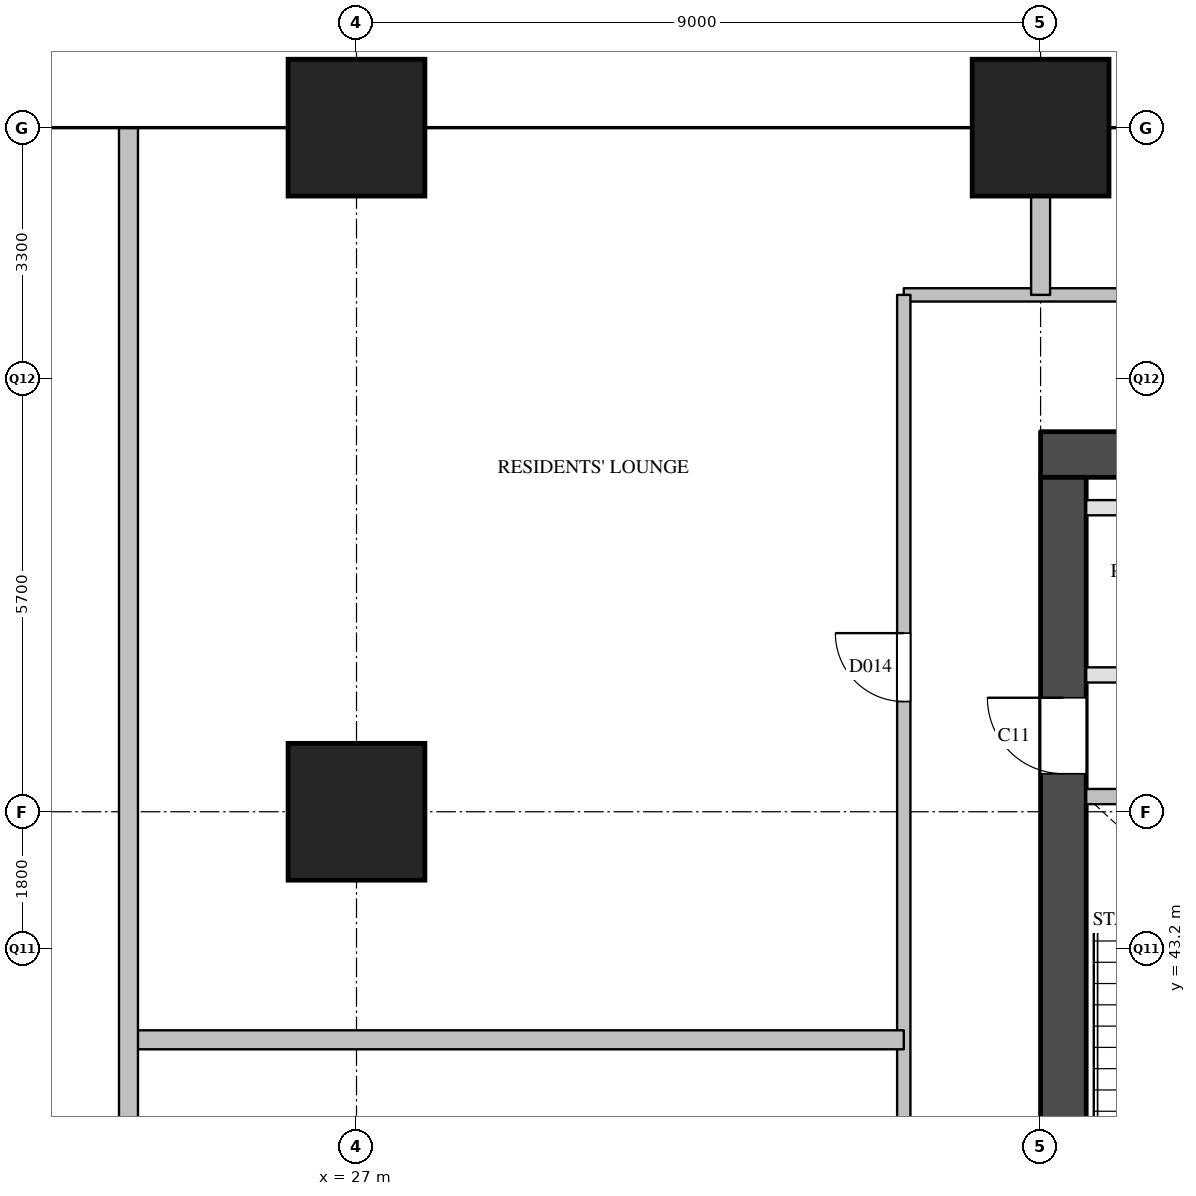
"""IFC4 building model, lengths in metres.
Left out: names, types, materials, properties, quantities, classifications, styles, units other than length and angle.
Written with IfcOpenShell. Run it as: python <this file> out.ifc"""

import sys

from ifc_helpers import new_model, si_unit, direction, frame, frame_2d, origin, origin_2d, place, context, subcontext, project, spatial, rectangle, extrude, element, fill, save


model = new_model("IFC4")
c1 = context("Model", 3, precision=1e-05, world=origin(), true_north=direction((0.0, 1.0)))
c2 = subcontext(c1, "Body", "Model", "MODEL_VIEW")
j1 = project(units=[si_unit("LENGTHUNIT", "METRE"), si_unit("PLANEANGLEUNIT", "RADIAN")], contexts=[c1])
p1 = place(None, origin())
s1 = spatial("IfcSite", under=j1, at=p1, CompositionType="ELEMENT")
p2 = place(p1, origin())
s2 = spatial("IfcBuilding", under=s1, at=p2, CompositionType="ELEMENT")
p3 = place(p2, frame((0.0, 0.0, 77.8)))
s3 = spatial("IfcBuildingStorey", under=s2, at=p3, CompositionType="ELEMENT", Elevation=77.8)
for number, where, z_axis, x_axis in (
    (1, (27.0, 45.0, 0.0), (0.0, 0.0, 1.0), (1.0, 0.0, 0.0)),
    (2, (27.0, 54.0, 0.0), (0.0, 0.0, 1.0), (1.0, 0.0, 0.0)),
    (3, (36.0, 54.0, 0.0), (0.0, 0.0, 1.0), (1.0, 0.0, 0.0)),
):
    element("IfcColumn", number, at=place(p3, frame(where, z_axis=z_axis, x_axis=x_axis)), inside=s3, PredefinedType="COLUMN", context=c2, shape_type="SweptSolid", body=[
        extrude(rectangle(XDim=1.8, YDim=1.8, at=origin_2d()), origin(), (0.0, 0.0, 1.0), 3.8),
    ])
p4 = place(p3, frame((36.0, 49.7, 0.0), z_axis=(0.0, 0.0, 1.0), x_axis=(1.0, 0.0, 0.0)))
e4 = element("IfcWall", 4, at=p4, inside=s3, PredefinedType="SHEAR", context=c2, shape_type="SweptSolid", body=[
    extrude(rectangle(XDim=12.4, YDim=0.6, at=frame_2d((6.2, 0.0))), origin(), (0.0, 0.0, 1.0), 3.5),
])
p5 = place(p3, frame((36.3, 29.1, 0.0), z_axis=(0.0, 0.0, 1.0), x_axis=(0.0, 1.0, 0.0)))
e5 = element("IfcWall", 5, at=p5, inside=s3, PredefinedType="SHEAR", context=c2, shape_type="SweptSolid", body=[
    extrude(rectangle(XDim=20.3, YDim=0.6, at=frame_2d((10.15, 0.0))), origin(), (0.0, 0.0, 1.0), 3.5),
])
p6 = place(p5, frame((3.6, 0.0, 0.0)))
e6 = element("IfcOpeningElement", 6, at=p6, cuts=e5, PredefinedType="OPENING", context=c2, shape_type="SweptSolid", body=[
    extrude(rectangle(XDim=1.8, YDim=2.1, at=frame_2d((0.9, 1.05))), frame((0.0, 0.31, 0.0), z_axis=(0.0, -1.0, 0.0), x_axis=(1.0, 0.0, 0.0)), (0.0, 0.0, 1.0), 0.62),
])
p7 = place(p5, frame((16.4, 0.0, 0.0)))
e7 = element("IfcOpeningElement", 7, at=p7, cuts=e5, PredefinedType="OPENING", context=c2, shape_type="SweptSolid", body=[
    extrude(rectangle(XDim=1.0, YDim=2.1, at=frame_2d((0.5, 1.05))), frame((0.0, 0.31, 0.0), z_axis=(0.0, -1.0, 0.0), x_axis=(1.0, 0.0, 0.0)), (0.0, 0.0, 1.0), 0.62),
])
p8 = place(p3, frame((36.6, 45.2, 0.0), z_axis=(0.0, 0.0, 1.0), x_axis=(1.0, 0.0, 0.0)))
e8 = element("IfcWall", 8, at=p8, inside=s3, PredefinedType="SOLIDWALL", context=c2, shape_type="SweptSolid", body=[
    extrude(rectangle(XDim=10.05, YDim=0.2, at=frame_2d((5.025, 0.0))), origin(), (0.0, 0.0, 1.0), 3.5),
])
p9 = place(p8, frame((1.125, 0.0, 0.0)))
e9 = element("IfcOpeningElement", 9, at=p9, cuts=e8, PredefinedType="OPENING", context=c2, shape_type="SweptSolid", body=[
    extrude(rectangle(XDim=1.1, YDim=2.1, at=frame_2d((0.55, 1.05))), frame((0.0, 0.11, 0.0), z_axis=(0.0, -1.0, 0.0), x_axis=(1.0, 0.0, 0.0)), (0.0, 0.0, 1.0), 0.22),
])
p10 = place(p8, frame((4.475, 0.0, 0.0)))
e10 = element("IfcOpeningElement", 10, at=p10, cuts=e8, PredefinedType="OPENING", context=c2, shape_type="SweptSolid", body=[
    extrude(rectangle(XDim=1.1, YDim=2.1, at=frame_2d((0.55, 1.05))), frame((0.0, 0.11, 0.0), z_axis=(0.0, -1.0, 0.0), x_axis=(1.0, 0.0, 0.0)), (0.0, 0.0, 1.0), 0.22),
])
p11 = place(p8, frame((7.825, 0.0, 0.0)))
e11 = element("IfcOpeningElement", 11, at=p11, cuts=e8, PredefinedType="OPENING", context=c2, shape_type="SweptSolid", body=[
    extrude(rectangle(XDim=1.1, YDim=2.1, at=frame_2d((0.55, 1.05))), frame((0.0, 0.11, 0.0), z_axis=(0.0, -1.0, 0.0), x_axis=(1.0, 0.0, 0.0)), (0.0, 0.0, 1.0), 0.22),
])
p12 = place(p3, frame((36.6, 46.8, 0.0), z_axis=(0.0, 0.0, 1.0), x_axis=(1.0, 0.0, 0.0)))
e12 = element("IfcWall", 12, at=p12, inside=s3, PredefinedType="PARTITIONING", context=c2, shape_type="SweptSolid", body=[
    extrude(rectangle(XDim=11.2, YDim=0.2, at=frame_2d((5.6, 0.0))), origin(), (0.0, 0.0, 1.0), 3.5),
])
p13 = place(p12, frame((0.67, 0.0, 0.0)))
e13 = element("IfcOpeningElement", 13, at=p13, cuts=e12, PredefinedType="OPENING", context=c2, shape_type="SweptSolid", body=[
    extrude(rectangle(XDim=0.9, YDim=2.1, at=frame_2d((0.45, 1.05))), frame((0.0, 0.11, 0.0), z_axis=(0.0, -1.0, 0.0), x_axis=(1.0, 0.0, 0.0)), (0.0, 0.0, 1.0), 0.22),
])
p14 = place(p12, frame((4.59, 0.0, 0.0)))
e14 = element("IfcOpeningElement", 14, at=p14, cuts=e12, PredefinedType="OPENING", context=c2, shape_type="SweptSolid", body=[
    extrude(rectangle(XDim=0.9, YDim=2.1, at=frame_2d((0.45, 1.05))), frame((0.0, 0.11, 0.0), z_axis=(0.0, -1.0, 0.0), x_axis=(1.0, 0.0, 0.0)), (0.0, 0.0, 1.0), 0.22),
])
p15 = place(p12, frame((9.07, 0.0, 0.0)))
e15 = element("IfcOpeningElement", 15, at=p15, cuts=e12, PredefinedType="OPENING", context=c2, shape_type="SweptSolid", body=[
    extrude(rectangle(XDim=0.9, YDim=2.1, at=frame_2d((0.45, 1.05))), frame((0.0, 0.11, 0.0), z_axis=(0.0, -1.0, 0.0), x_axis=(1.0, 0.0, 0.0)), (0.0, 0.0, 1.0), 0.22),
])
p16 = place(p3, frame((36.6, 49.0, 0.0), z_axis=(0.0, 0.0, 1.0), x_axis=(1.0, 0.0, 0.0)))
e16 = element("IfcWall", 16, at=p16, inside=s3, PredefinedType="PARTITIONING", context=c2, shape_type="SweptSolid", body=[
    extrude(rectangle(XDim=11.2, YDim=0.2, at=frame_2d((5.6, 0.0))), origin(), (0.0, 0.0, 1.0), 3.5),
])
p17 = place(p3, frame((34.2, 51.8, 0.0), z_axis=(0.0, 0.0, 1.0), x_axis=(1.0, 0.0, 0.0)))
e17 = element("IfcWall", 17, at=p17, inside=s3, PredefinedType="PARTITIONING", context=c2, shape_type="SweptSolid", body=[
    extrude(rectangle(XDim=16.0, YDim=0.175, at=frame_2d((8.0, 0.0))), origin(), (0.0, 0.0, 1.0), 3.5),
])
p18 = place(p17, frame((7.129, 0.0, 0.0)))
e18 = element("IfcOpeningElement", 18, at=p18, cuts=e17, PredefinedType="OPENING", context=c2, shape_type="SweptSolid", body=[
    extrude(rectangle(XDim=0.9, YDim=2.1, at=frame_2d((0.45, 1.05))), frame((0.0, 0.097, 0.0), z_axis=(0.0, -1.0, 0.0), x_axis=(1.0, 0.0, 0.0)), (0.0, 0.0, 1.0), 0.195),
])
p19 = place(p3, frame((34.2, 29.12, 0.0), z_axis=(0.0, 0.0, 1.0), x_axis=(0.0, 1.0, 0.0)))
e19 = element("IfcWall", 19, at=p19, inside=s3, PredefinedType="PARTITIONING", context=c2, shape_type="SweptSolid", body=[
    extrude(rectangle(XDim=22.68, YDim=0.175, at=frame_2d((11.34, 0.0))), origin(), (0.0, 0.0, 1.0), 3.5),
])
p20 = place(p19, frame((2.94, 0.0, 0.0)))
e20 = element("IfcOpeningElement", 20, at=p20, cuts=e19, PredefinedType="OPENING", context=c2, shape_type="SweptSolid", body=[
    extrude(rectangle(XDim=1.0, YDim=2.1, at=frame_2d((0.5, 1.05))), frame((0.0, 0.097, 0.0), z_axis=(0.0, -1.0, 0.0), x_axis=(1.0, 0.0, 0.0)), (0.0, 0.0, 1.0), 0.195),
])
p21 = place(p19, frame((9.38, 0.0, 0.0)))
e21 = element("IfcOpeningElement", 21, at=p21, cuts=e19, PredefinedType="OPENING", context=c2, shape_type="SweptSolid", body=[
    extrude(rectangle(XDim=1.0, YDim=2.1, at=frame_2d((0.5, 1.05))), frame((0.0, 0.097, 0.0), z_axis=(0.0, -1.0, 0.0), x_axis=(1.0, 0.0, 0.0)), (0.0, 0.0, 1.0), 0.195),
])
p22 = place(p19, frame((17.33, 0.0, 0.0)))
e22 = element("IfcOpeningElement", 22, at=p22, cuts=e19, PredefinedType="OPENING", context=c2, shape_type="SweptSolid", body=[
    extrude(rectangle(XDim=0.9, YDim=2.1, at=frame_2d((0.45, 1.05))), frame((0.0, 0.097, 0.0), z_axis=(0.0, -1.0, 0.0), x_axis=(1.0, 0.0, 0.0)), (0.0, 0.0, 1.0), 0.195),
])
p23 = place(p3, frame((24.0, 42.0, 0.0), z_axis=(0.0, 0.0, 1.0), x_axis=(1.0, 0.0, 0.0)))
e23 = element("IfcWall", 23, at=p23, inside=s3, PredefinedType="PARTITIONING", context=c2, shape_type="SweptSolid", body=[
    extrude(rectangle(XDim=10.2, YDim=0.25, at=frame_2d((5.1, 0.0))), origin(), (0.0, 0.0, 1.0), 2.5),
])
p24 = place(p3, frame((24.0, 36.0, 0.0), z_axis=(0.0, 0.0, 1.0), x_axis=(0.0, 1.0, 0.0)))
e24 = element("IfcWall", 24, at=p24, inside=s3, PredefinedType="PARTITIONING", context=c2, shape_type="SweptSolid", body=[
    extrude(rectangle(XDim=18.0, YDim=0.25, at=frame_2d((9.0, 0.0))), origin(), (0.0, 0.0, 1.0), 2.5),
])
p25 = place(p3, frame((36.0, 51.8, 0.0), z_axis=(0.0, 0.0, 1.0), x_axis=(0.0, 1.0, 0.0)))
e25 = element("IfcWall", 25, at=p25, inside=s3, PredefinedType="PARTITIONING", context=c2, shape_type="SweptSolid", body=[
    extrude(rectangle(XDim=2.2, YDim=0.25, at=frame_2d((1.1, 0.0))), origin(), (0.0, 0.0, 1.0), 3.5),
])
p26 = place(p7, origin())
e26 = element("IfcDoor", 26, at=p26, inside=s3, OperationType="SINGLE_SWING_RIGHT", PredefinedType="DOOR", context=c2, shape_type="SweptSolid", body=[
    extrude(rectangle(XDim=1.0, YDim=2.1, at=frame_2d((0.5, 1.05))), frame((0.0, 0.025, 0.0), z_axis=(0.0, -1.0, 0.0), x_axis=(1.0, 0.0, 0.0)), (0.0, 0.0, 1.0), 0.05),
])
fill(e7, e26)
p27 = place(p22, origin())
e27 = element("IfcDoor", 27, at=p27, inside=s3, OperationType="SINGLE_SWING_RIGHT", PredefinedType="DOOR", context=c2, shape_type="SweptSolid", body=[
    extrude(rectangle(XDim=0.9, YDim=2.1, at=frame_2d((0.45, 1.05))), frame((0.0, 0.025, 0.0), z_axis=(0.0, -1.0, 0.0), x_axis=(1.0, 0.0, 0.0)), (0.0, 0.0, 1.0), 0.05),
])
fill(e22, e27)
save(model, sys.argv[1])
